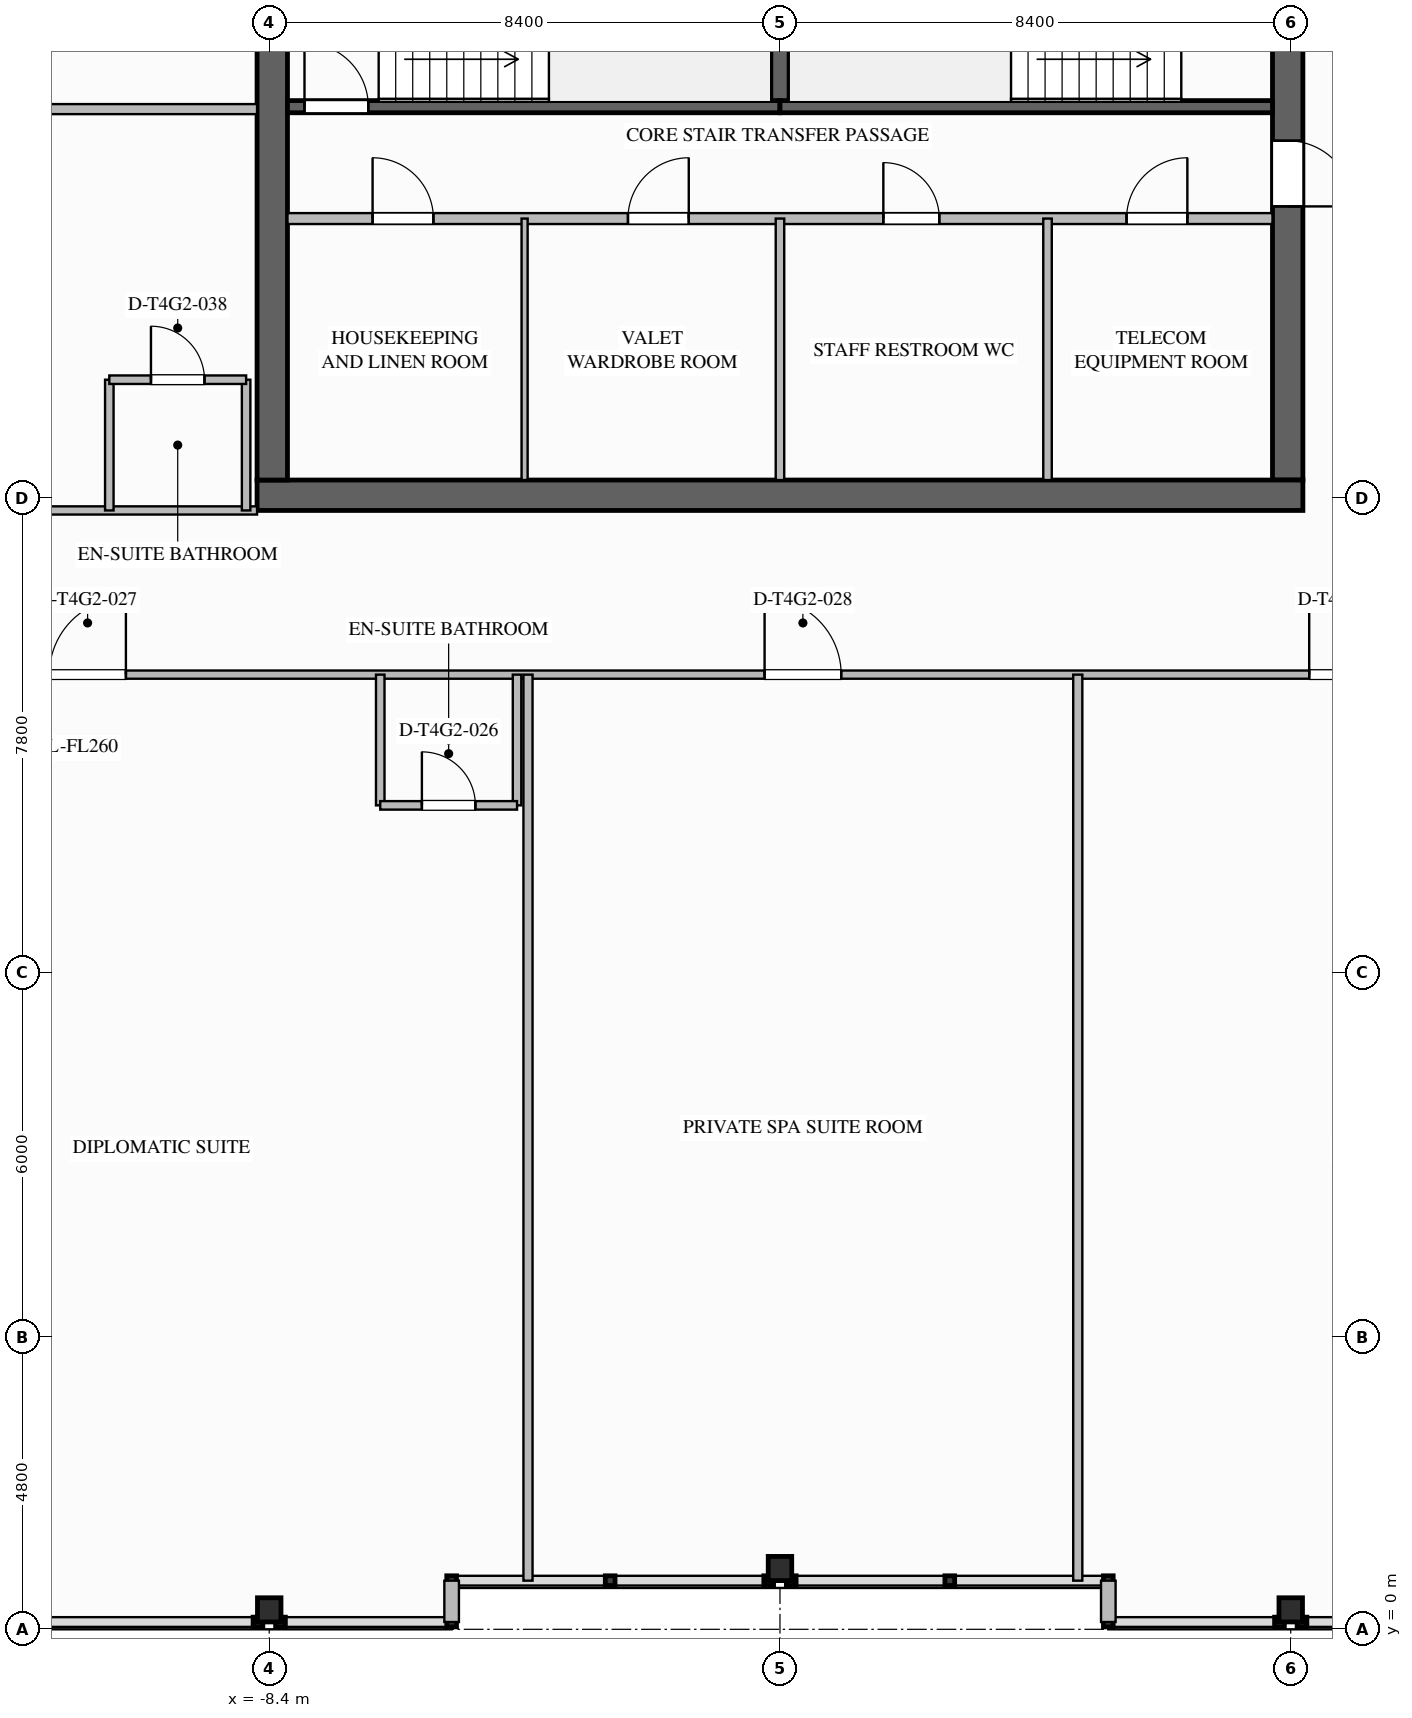
"""IFC4 building model, lengths in metres.
Left out: names, types, materials, properties, quantities, classifications, styles, units other than length and angle.
Written with IfcOpenShell. Run it as: python <this file> out.ifc"""

import sys

from ifc_helpers import new_model, si_unit, direction, frame, frame_2d, origin, origin_2d, place, context, subcontext, project, spatial, rectangle, i_section, extrude, element, fill, save


model = new_model("IFC4")
c1 = context("Model", 3, precision=1e-05, world=origin(), true_north=direction((0.0, 1.0)))
c2 = subcontext(c1, "Body", "Model", "MODEL_VIEW")
j1 = project(units=[si_unit("LENGTHUNIT", "METRE"), si_unit("PLANEANGLEUNIT", "RADIAN")], contexts=[c1])
p1 = place(None, origin())
s1 = spatial("IfcSite", under=j1, at=p1, CompositionType="ELEMENT")
p2 = place(p1, origin())
s2 = spatial("IfcBuilding", under=s1, at=p2, CompositionType="ELEMENT")
p3 = place(p2, frame((0.0, 0.0, 215.9)))
s3 = spatial("IfcBuildingStorey", under=s2, at=p3, CompositionType="ELEMENT", Elevation=215.9)
p4 = place(p3, frame((8.35, 35.1, 0.0), z_axis=(0.0, 0.0, 1.0), x_axis=(0.0, -1.0, 0.0)))
e1 = element("IfcWall", 1, at=p4, inside=s3, PredefinedType="SHEAR", context=c2, shape_type="SweptSolid", body=[
    extrude(rectangle(XDim=16.2, YDim=0.5, at=frame_2d((8.1, 0.0))), origin(), (0.0, 0.0, 1.0), 3.6),
])
p5 = place(p4, frame((3.08, 0.0, 0.0)))
e2 = element("IfcOpeningElement", 2, at=p5, cuts=e1, PredefinedType="OPENING", context=c2, shape_type="SweptSolid", body=[
    extrude(rectangle(XDim=1.12, YDim=2.1, at=frame_2d((0.56, 1.05))), frame((0.0, 0.26, 0.0), z_axis=(0.0, -1.0, 0.0), x_axis=(1.0, 0.0, 0.0)), (0.0, 0.0, 1.0), 0.52),
])
p6 = place(p4, frame((10.62, 0.0, 0.0)))
e3 = element("IfcOpeningElement", 3, at=p6, cuts=e1, PredefinedType="OPENING", context=c2, shape_type="SweptSolid", body=[
    extrude(rectangle(XDim=1.08, YDim=2.04, at=frame_2d((0.54, 1.02))), frame((0.0, 0.26, 0.0), z_axis=(0.0, -1.0, 0.0), x_axis=(1.0, 0.0, 0.0)), (0.0, 0.0, 1.0), 0.52),
])
p7 = place(p3, frame((8.6, 18.65, 0.0), z_axis=(0.0, 0.0, 1.0), x_axis=(-1.0, 0.0, 0.0)))
e4 = element("IfcWall", 4, at=p7, inside=s3, PredefinedType="SHEAR", context=c2, shape_type="SweptSolid", body=[
    extrude(rectangle(XDim=17.2, YDim=0.5, at=frame_2d((8.6, 0.0))), origin(), (0.0, 0.0, 1.0), 3.6),
])
p8 = place(p3, frame((-8.35, 18.9, 0.0), z_axis=(0.0, 0.0, 1.0), x_axis=(0.0, 1.0, 0.0)))
e5 = element("IfcWall", 5, at=p8, inside=s3, PredefinedType="SHEAR", context=c2, shape_type="SweptSolid", body=[
    extrude(rectangle(XDim=16.2, YDim=0.5, at=frame_2d((8.1, 0.0))), origin(), (0.0, 0.0, 1.0), 3.6),
])
for number, where, z_axis, x_axis in (
    (6, (-8.4, 0.32, 0.0), (0.0, 0.0, 1.0), (0.0, 1.0, 0.0)),
    (7, (0.0, 1.0, 0.0), (0.0, 0.0, 1.0), (0.0, 1.0, 0.0)),
    (8, (8.4, 0.32, 0.0), (0.0, 0.0, 1.0), (0.0, 1.0, 0.0)),
):
    element("IfcColumn", number, at=place(p3, frame(where, z_axis=z_axis, x_axis=x_axis)), inside=s3, PredefinedType="COLUMN", context=c2, shape_type="SweptSolid", body=[
        extrude(i_section(OverallWidth=0.397, OverallDepth=0.387, WebThickness=0.021, FlangeThickness=0.033, FilletRadius=0.025, at=origin_2d()), origin(), (0.0, 0.0, 1.0), 3.597),
    ])
for number, where, z_axis, x_axis in (
    (9, (5.4, 0.12, 0.0), (0.0, 0.0, 1.0), (0.0, 1.0, 0.0)),
    (10, (-5.4, 0.8, 0.0), (0.0, 0.0, 1.0), (0.0, -1.0, 0.0)),
):
    element("IfcWall", number, at=place(p3, frame(where, z_axis=z_axis, x_axis=x_axis)), inside=s3, PredefinedType="STANDARD", context=c2, shape_type="SweptSolid", body=[
        extrude(rectangle(XDim=0.68, YDim=0.24, at=frame_2d((0.34, 0.0))), origin(), (0.0, 0.0, 1.0), 3.34),
    ])
p9 = place(p3, frame((0.0, 25.04, 0.0), z_axis=(0.0, 0.0, 1.0), x_axis=(0.0, 1.0, 0.0)))
e11 = element("IfcWall", 11, at=p9, inside=s3, PredefinedType="SOLIDWALL", context=c2, shape_type="SweptSolid", body=[
    extrude(rectangle(XDim=3.12, YDim=0.3, at=frame_2d((1.56, 0.0))), origin(), (0.0, 0.0, 1.0), 3.34),
])
p10 = place(p3, frame((-8.1, 25.04, 0.0), z_axis=(0.0, 0.0, 1.0), x_axis=(1.0, 0.0, 0.0)))
e12 = element("IfcWall", 12, at=p10, inside=s3, PredefinedType="SOLIDWALL", context=c2, shape_type="SweptSolid", body=[
    extrude(rectangle(XDim=8.1, YDim=0.2, at=frame_2d((4.05, 0.0))), origin(), (0.0, 0.0, 1.0), 3.34),
])
p11 = place(p10, frame((0.28, 0.0, 0.0)))
e13 = element("IfcOpeningElement", 13, at=p11, cuts=e12, PredefinedType="OPENING", context=c2, shape_type="SweptSolid", body=[
    extrude(rectangle(XDim=1.05, YDim=2.1, at=frame_2d((0.525, 1.05))), frame((0.0, 0.11, 0.0), z_axis=(0.0, -1.0, 0.0), x_axis=(1.0, 0.0, 0.0)), (0.0, 0.0, 1.0), 0.22),
])
p12 = place(p3, frame((0.0, 25.04, 0.0), z_axis=(0.0, 0.0, 1.0), x_axis=(1.0, 0.0, 0.0)))
e14 = element("IfcWall", 14, at=p12, inside=s3, PredefinedType="SOLIDWALL", context=c2, shape_type="SweptSolid", body=[
    extrude(rectangle(XDim=8.1, YDim=0.2, at=frame_2d((4.05, 0.0))), origin(), (0.0, 0.0, 1.0), 3.34),
])
p13 = place(p3, frame((-8.1, 23.2, 0.0), z_axis=(0.0, 0.0, 1.0), x_axis=(1.0, 0.0, 0.0)))
e15 = element("IfcWall", 15, at=p13, inside=s3, PredefinedType="SOLIDWALL", context=c2, shape_type="SweptSolid", body=[
    extrude(rectangle(XDim=16.2, YDim=0.18, at=frame_2d((8.1, 0.0))), origin(), (0.0, 0.0, 1.0), 3.34),
])
p14 = place(p13, frame((1.4, 0.0, 0.0)))
e16 = element("IfcOpeningElement", 16, at=p14, cuts=e15, PredefinedType="OPENING", context=c2, shape_type="SweptSolid", body=[
    extrude(rectangle(XDim=1.0, YDim=2.1, at=frame_2d((0.5, 1.05))), frame((0.0, 0.1, 0.0), z_axis=(0.0, -1.0, 0.0), x_axis=(1.0, 0.0, 0.0)), (0.0, 0.0, 1.0), 0.2),
])
p15 = place(p13, frame((5.6, 0.0, 0.0)))
e17 = element("IfcOpeningElement", 17, at=p15, cuts=e15, PredefinedType="OPENING", context=c2, shape_type="SweptSolid", body=[
    extrude(rectangle(XDim=1.0, YDim=2.1, at=frame_2d((0.5, 1.05))), frame((0.0, 0.1, 0.0), z_axis=(0.0, -1.0, 0.0), x_axis=(1.0, 0.0, 0.0)), (0.0, 0.0, 1.0), 0.2),
])
p16 = place(p13, frame((9.8, 0.0, 0.0)))
e18 = element("IfcOpeningElement", 18, at=p16, cuts=e15, PredefinedType="OPENING", context=c2, shape_type="SweptSolid", body=[
    extrude(rectangle(XDim=0.92, YDim=2.1, at=frame_2d((0.46, 1.05))), frame((0.0, 0.1, 0.0), z_axis=(0.0, -1.0, 0.0), x_axis=(1.0, 0.0, 0.0)), (0.0, 0.0, 1.0), 0.2),
])
p17 = place(p13, frame((13.8, 0.0, 0.0)))
e19 = element("IfcOpeningElement", 19, at=p17, cuts=e15, PredefinedType="OPENING", context=c2, shape_type="SweptSolid", body=[
    extrude(rectangle(XDim=1.0, YDim=2.1, at=frame_2d((0.5, 1.05))), frame((0.0, 0.1, 0.0), z_axis=(0.0, -1.0, 0.0), x_axis=(1.0, 0.0, 0.0)), (0.0, 0.0, 1.0), 0.2),
])
p18 = place(p3, frame((-4.2, 18.9, 0.0), z_axis=(0.0, 0.0, 1.0), x_axis=(0.0, 1.0, 0.0)))
e20 = element("IfcWall", 20, at=p18, inside=s3, PredefinedType="PARTITIONING", context=c2, shape_type="SweptSolid", body=[
    extrude(rectangle(XDim=4.3, YDim=0.1, at=frame_2d((2.15, 0.0))), origin(), (0.0, 0.0, 1.0), 3.34),
])
for number, where, z_axis, x_axis in (
    (21, (0.0, 18.9, 0.0), (0.0, 0.0, 1.0), (0.0, 1.0, 0.0)),
    (22, (4.4, 18.9, 0.0), (0.0, 0.0, 1.0), (0.0, 1.0, 0.0)),
):
    element("IfcWall", number, at=place(p3, frame(where, z_axis=z_axis, x_axis=x_axis)), inside=s3, PredefinedType="PLUMBINGWALL", context=c2, shape_type="SweptSolid", body=[
        extrude(rectangle(XDim=4.3, YDim=0.14, at=frame_2d((2.15, 0.0))), origin(), (0.0, 0.0, 1.0), 3.34),
    ])
p19 = place(p3, frame((-16.2, 15.7, 0.0), z_axis=(0.0, 0.0, 1.0), x_axis=(1.0, 0.0, 0.0)))
e23 = element("IfcWall", 23, at=p19, inside=s3, PredefinedType="PARTITIONING", context=c2, shape_type="SweptSolid", body=[
    extrude(rectangle(XDim=38.28, YDim=0.135, at=frame_2d((19.14, 0.0))), origin(), (0.0, 0.0, 1.0), 3.34),
])
p20 = place(p19, frame((33.355, 0.0, 0.0)))
e24 = element("IfcOpeningElement", 24, at=p20, cuts=e23, PredefinedType="OPENING", context=c2, shape_type="SweptSolid", body=[
    extrude(rectangle(XDim=1.26, YDim=2.2, at=frame_2d((0.63, 1.1))), frame((0.0, 0.077, 0.0), z_axis=(0.0, -1.0, 0.0), x_axis=(1.0, 0.0, 0.0)), (0.0, 0.0, 1.0), 0.155),
])
p21 = place(p19, frame((4.183, 0.0, 0.0)))
e25 = element("IfcOpeningElement", 25, at=p21, cuts=e23, PredefinedType="OPENING", context=c2, shape_type="SweptSolid", body=[
    extrude(rectangle(XDim=1.26, YDim=2.2, at=frame_2d((0.63, 1.1))), frame((0.0, 0.077, 0.0), z_axis=(0.0, -1.0, 0.0), x_axis=(1.0, 0.0, 0.0)), (0.0, 0.0, 1.0), 0.155),
])
p22 = place(p19, frame((15.947, 0.0, 0.0)))
e26 = element("IfcOpeningElement", 26, at=p22, cuts=e23, PredefinedType="OPENING", context=c2, shape_type="SweptSolid", body=[
    extrude(rectangle(XDim=1.26, YDim=2.2, at=frame_2d((0.63, 1.1))), frame((0.0, 0.077, 0.0), z_axis=(0.0, -1.0, 0.0), x_axis=(1.0, 0.0, 0.0)), (0.0, 0.0, 1.0), 0.155),
])
p23 = place(p19, frame((24.904, 0.0, 0.0)))
e27 = element("IfcOpeningElement", 27, at=p23, cuts=e23, PredefinedType="OPENING", context=c2, shape_type="SweptSolid", body=[
    extrude(rectangle(XDim=1.26, YDim=2.2, at=frame_2d((0.63, 1.1))), frame((0.0, 0.077, 0.0), z_axis=(0.0, -1.0, 0.0), x_axis=(1.0, 0.0, 0.0)), (0.0, 0.0, 1.0), 0.155),
])
p24 = place(p3, frame((-16.2, 18.4, 0.0), z_axis=(0.0, 0.0, 1.0), x_axis=(1.0, 0.0, 0.0)))
e28 = element("IfcWall", 28, at=p24, inside=s3, PredefinedType="PARTITIONING", context=c2, shape_type="SweptSolid", body=[
    extrude(rectangle(XDim=7.6, YDim=0.135, at=frame_2d((3.8, 0.0))), origin(), (0.0, 0.0, 1.0), 2.718),
])
p25 = place(p24, frame((2.155, 0.0, 0.0)))
e29 = element("IfcOpeningElement", 29, at=p25, cuts=e28, PredefinedType="OPENING", context=c2, shape_type="SweptSolid", body=[
    extrude(rectangle(XDim=1.26, YDim=2.2, at=frame_2d((0.63, 1.1))), frame((0.0, 0.077, 0.0), z_axis=(0.0, -1.0, 0.0), x_axis=(1.0, 0.0, 0.0)), (0.0, 0.0, 1.0), 0.155),
])
for number, where, z_axis, x_axis in (
    (30, (-6.574, 15.7, 0.0), (0.0, 0.0, 1.0), (0.0, -1.0, 0.0)),
    (31, (-4.324, 15.7, 0.0), (0.0, 0.0, 1.0), (0.0, -1.0, 0.0)),
):
    element("IfcWall", number, at=place(p3, frame(where, z_axis=z_axis, x_axis=x_axis)), inside=s3, PredefinedType="PLUMBINGWALL", context=c2, shape_type="SweptSolid", body=[
        extrude(rectangle(XDim=2.15, YDim=0.14, at=frame_2d((1.075, 0.0))), origin(), (0.0, 0.0, 1.0), 3.34),
    ])
p26 = place(p3, frame((-6.574, 13.55, 0.0), z_axis=(0.0, 0.0, 1.0), x_axis=(1.0, 0.0, 0.0)))
e32 = element("IfcWall", 32, at=p26, inside=s3, PredefinedType="PLUMBINGWALL", context=c2, shape_type="SweptSolid", body=[
    extrude(rectangle(XDim=2.25, YDim=0.14, at=frame_2d((1.125, 0.0))), origin(), (0.0, 0.0, 1.0), 3.34),
])
p27 = place(p26, frame((0.685, 0.0, 0.0)))
e33 = element("IfcOpeningElement", 33, at=p27, cuts=e32, PredefinedType="OPENING", context=c2, shape_type="SweptSolid", body=[
    extrude(rectangle(XDim=0.88, YDim=2.1, at=frame_2d((0.44, 1.05))), frame((0.0, 0.08, 0.0), z_axis=(0.0, -1.0, 0.0), x_axis=(1.0, 0.0, 0.0)), (0.0, 0.0, 1.0), 0.16),
])
for number, where, z_axis, x_axis in (
    (34, (-4.144, 0.8, 0.0), (0.0, 0.0, 1.0), (0.0, 1.0, 0.0)),
    (35, (4.898, 0.8, 0.0), (0.0, 0.0, 1.0), (0.0, 1.0, 0.0)),
):
    element("IfcWall", number, at=place(p3, frame(where, z_axis=z_axis, x_axis=x_axis)), inside=s3, PredefinedType="PARTITIONING", context=c2, shape_type="SweptSolid", body=[
        extrude(rectangle(XDim=14.9, YDim=0.15, at=frame_2d((7.45, 0.0))), origin(), (0.0, 0.0, 1.0), 3.34),
    ])
p28 = place(p3, frame((-21.4, 25.0, 0.0), z_axis=(0.0, 0.0, 1.0), x_axis=(1.0, 0.0, 0.0)))
e36 = element("IfcWall", 36, at=p28, inside=s3, PredefinedType="PARTITIONING", context=c2, shape_type="SweptSolid", body=[
    extrude(rectangle(XDim=12.8, YDim=0.165, at=frame_2d((6.4, 0.0))), origin(), (0.0, 0.0, 1.0), 3.34),
])
for number, where, z_axis, x_axis in (
    (37, (-11.03, 18.4, 0.0), (0.0, 0.0, 1.0), (0.0, 1.0, 0.0)),
    (38, (-8.78, 18.4, 0.0), (0.0, 0.0, 1.0), (0.0, 1.0, 0.0)),
):
    element("IfcWall", number, at=place(p3, frame(where, z_axis=z_axis, x_axis=x_axis)), inside=s3, PredefinedType="PLUMBINGWALL", context=c2, shape_type="SweptSolid", body=[
        extrude(rectangle(XDim=2.15, YDim=0.14, at=frame_2d((1.075, 0.0))), origin(), (0.0, 0.0, 1.0), 3.34),
    ])
p29 = place(p3, frame((-11.03, 20.55, 0.0), z_axis=(0.0, 0.0, 1.0), x_axis=(1.0, 0.0, 0.0)))
e39 = element("IfcWall", 39, at=p29, inside=s3, PredefinedType="PLUMBINGWALL", context=c2, shape_type="SweptSolid", body=[
    extrude(rectangle(XDim=2.25, YDim=0.14, at=frame_2d((1.125, 0.0))), origin(), (0.0, 0.0, 1.0), 3.34),
])
p30 = place(p29, frame((0.685, 0.0, 0.0)))
e40 = element("IfcOpeningElement", 40, at=p30, cuts=e39, PredefinedType="OPENING", context=c2, shape_type="SweptSolid", body=[
    extrude(rectangle(XDim=0.88, YDim=2.1, at=frame_2d((0.44, 1.05))), frame((0.0, 0.08, 0.0), z_axis=(0.0, -1.0, 0.0), x_axis=(1.0, 0.0, 0.0)), (0.0, 0.0, 1.0), 0.16),
])
p31 = place(p11, origin())
e41 = element("IfcDoor", 41, at=p31, inside=s3, OperationType="SINGLE_SWING_LEFT", PredefinedType="DOOR", context=c2, shape_type="SweptSolid", body=[
    extrude(rectangle(XDim=1.05, YDim=2.1, at=frame_2d((0.525, 1.05))), frame((0.0, 0.025, 0.0), z_axis=(0.0, -1.0, 0.0), x_axis=(1.0, 0.0, 0.0)), (0.0, 0.0, 1.0), 0.05),
])
fill(e13, e41)
p32 = place(p6, origin())
e42 = element("IfcDoor", 42, at=p32, inside=s3, OperationType="SINGLE_SWING_RIGHT", PredefinedType="DOOR", context=c2, shape_type="SweptSolid", body=[
    extrude(rectangle(XDim=1.08, YDim=2.04, at=frame_2d((0.54, 1.02))), frame((0.0, 0.025, 0.0), z_axis=(0.0, -1.0, 0.0), x_axis=(1.0, 0.0, 0.0)), (0.0, 0.0, 1.0), 0.05),
])
fill(e3, e42)
p33 = place(p14, origin())
e43 = element("IfcDoor", 43, at=p33, inside=s3, OperationType="SINGLE_SWING_LEFT", PredefinedType="DOOR", context=c2, shape_type="SweptSolid", body=[
    extrude(rectangle(XDim=1.0, YDim=2.1, at=frame_2d((0.5, 1.05))), frame((0.0, 0.025, 0.0), z_axis=(0.0, -1.0, 0.0), x_axis=(1.0, 0.0, 0.0)), (0.0, 0.0, 1.0), 0.05),
])
fill(e16, e43)
p34 = place(p15, origin())
e44 = element("IfcDoor", 44, at=p34, inside=s3, OperationType="SINGLE_SWING_RIGHT", PredefinedType="DOOR", context=c2, shape_type="SweptSolid", body=[
    extrude(rectangle(XDim=1.0, YDim=2.1, at=frame_2d((0.5, 1.05))), frame((0.0, 0.025, 0.0), z_axis=(0.0, -1.0, 0.0), x_axis=(1.0, 0.0, 0.0)), (0.0, 0.0, 1.0), 0.05),
])
fill(e17, e44)
p35 = place(p16, origin())
e45 = element("IfcDoor", 45, at=p35, inside=s3, OperationType="SINGLE_SWING_LEFT", PredefinedType="DOOR", context=c2, shape_type="SweptSolid", body=[
    extrude(rectangle(XDim=0.92, YDim=2.1, at=frame_2d((0.46, 1.05))), frame((0.0, 0.025, 0.0), z_axis=(0.0, -1.0, 0.0), x_axis=(1.0, 0.0, 0.0)), (0.0, 0.0, 1.0), 0.05),
])
fill(e18, e45)
p36 = place(p17, origin())
e46 = element("IfcDoor", 46, at=p36, inside=s3, OperationType="SINGLE_SWING_RIGHT", PredefinedType="DOOR", context=c2, shape_type="SweptSolid", body=[
    extrude(rectangle(XDim=1.0, YDim=2.1, at=frame_2d((0.5, 1.05))), frame((0.0, 0.025, 0.0), z_axis=(0.0, -1.0, 0.0), x_axis=(1.0, 0.0, 0.0)), (0.0, 0.0, 1.0), 0.05),
])
fill(e19, e46)
p37 = place(p27, origin())
e47 = element("IfcDoor", 47, at=p37, inside=s3, OperationType="SINGLE_SWING_LEFT", PredefinedType="DOOR", context=c2, shape_type="SweptSolid", body=[
    extrude(rectangle(XDim=0.88, YDim=2.1, at=frame_2d((0.44, 1.05))), frame((0.0, 0.025, 0.0), z_axis=(0.0, -1.0, 0.0), x_axis=(1.0, 0.0, 0.0)), (0.0, 0.0, 1.0), 0.05),
])
fill(e33, e47)
p38 = place(p21, origin())
e48 = element("IfcDoor", 48, at=p38, inside=s3, OperationType="SINGLE_SWING_RIGHT", PredefinedType="DOOR", context=c2, shape_type="SweptSolid", body=[
    extrude(rectangle(XDim=1.26, YDim=2.2, at=frame_2d((0.63, 1.1))), frame((0.0, 0.025, 0.0), z_axis=(0.0, -1.0, 0.0), x_axis=(1.0, 0.0, 0.0)), (0.0, 0.0, 1.0), 0.05),
])
fill(e25, e48)
p39 = place(p22, origin())
e49 = element("IfcDoor", 49, at=p39, inside=s3, OperationType="SINGLE_SWING_LEFT", PredefinedType="DOOR", context=c2, shape_type="SweptSolid", body=[
    extrude(rectangle(XDim=1.26, YDim=2.2, at=frame_2d((0.63, 1.1))), frame((0.0, 0.025, 0.0), z_axis=(0.0, -1.0, 0.0), x_axis=(1.0, 0.0, 0.0)), (0.0, 0.0, 1.0), 0.05),
])
fill(e26, e49)
p40 = place(p23, origin())
e50 = element("IfcDoor", 50, at=p40, inside=s3, OperationType="SINGLE_SWING_LEFT", PredefinedType="DOOR", context=c2, shape_type="SweptSolid", body=[
    extrude(rectangle(XDim=1.26, YDim=2.2, at=frame_2d((0.63, 1.1))), frame((0.0, 0.025, 0.0), z_axis=(0.0, -1.0, 0.0), x_axis=(1.0, 0.0, 0.0)), (0.0, 0.0, 1.0), 0.05),
])
fill(e27, e50)
p41 = place(p30, origin())
e51 = element("IfcDoor", 51, at=p41, inside=s3, OperationType="SINGLE_SWING_LEFT", PredefinedType="DOOR", context=c2, shape_type="SweptSolid", body=[
    extrude(rectangle(XDim=0.88, YDim=2.1, at=frame_2d((0.44, 1.05))), frame((0.0, 0.025, 0.0), z_axis=(0.0, -1.0, 0.0), x_axis=(1.0, 0.0, 0.0)), (0.0, 0.0, 1.0), 0.05),
])
fill(e40, e51)
save(model, sys.argv[1])
